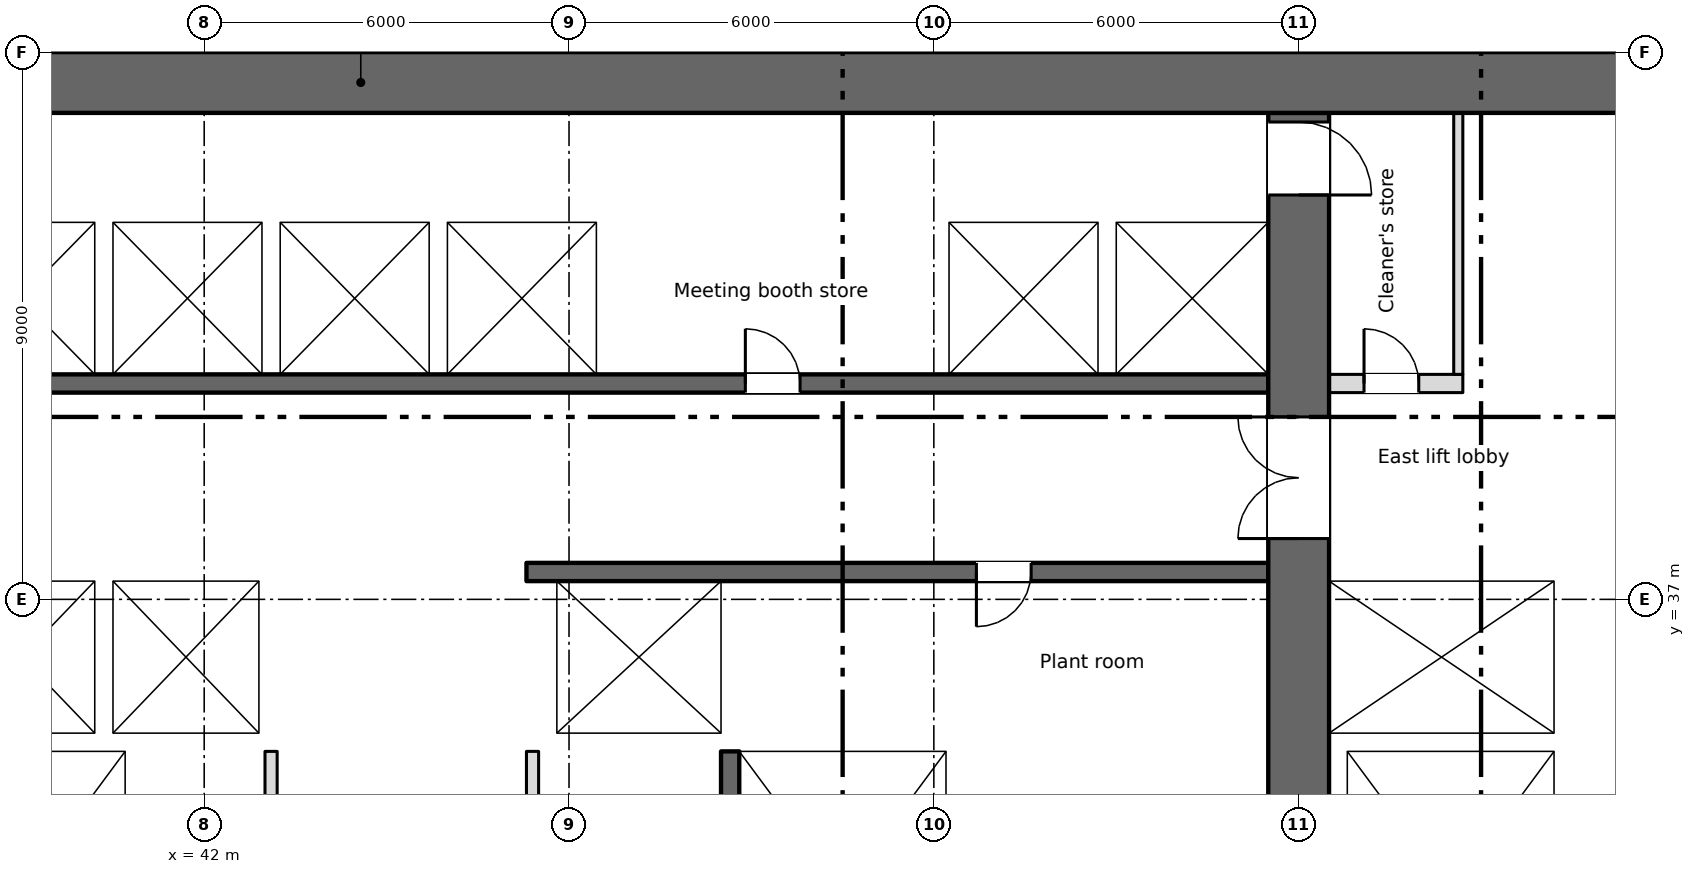
"""IFC4 building model, lengths in metres.
Left out: names, types, materials, properties, quantities, classifications, styles, units other than length and angle.
Written with IfcOpenShell. Run it as: python <this file> out.ifc"""

import sys

from ifc_helpers import new_model, si_unit, direction, frame, frame_2d, origin, place, context, subcontext, project, spatial, rectangle, extrude, element, fill, save


model = new_model("IFC4")
c1 = context("Model", 3, precision=1e-05, world=origin(), true_north=direction((0.0, 1.0)))
c2 = subcontext(c1, "Body", "Model", "MODEL_VIEW")
j1 = project(units=[si_unit("LENGTHUNIT", "METRE"), si_unit("PLANEANGLEUNIT", "RADIAN")], contexts=[c1])
p1 = place(None, origin())
s1 = spatial("IfcSite", under=j1, at=p1, CompositionType="ELEMENT")
p2 = place(p1, origin())
s2 = spatial("IfcBuilding", under=s1, at=p2, CompositionType="ELEMENT")
p3 = place(p2, frame((0.0, 0.0, 71.25)))
s3 = spatial("IfcBuildingStorey", under=s2, at=p3, CompositionType="ELEMENT", Elevation=71.25)
p4 = place(p3, frame((5.55, 45.5, 0.0), z_axis=(0.0, 0.0, 1.0), x_axis=(1.0, 0.0, 0.0)))
e1 = element("IfcWall", 1, at=p4, inside=s3, PredefinedType="SHEAR", context=c2, shape_type="SweptSolid", body=[
    extrude(rectangle(XDim=66.9, YDim=1.0, at=frame_2d((33.45, 0.0))), origin(), (0.0, 0.0, 1.0), 3.35),
])
p5 = place(p4, frame((1.2, 0.0, 0.6)))
e2 = element("IfcOpeningElement", 2, at=p5, cuts=e1, PredefinedType="OPENING", context=c2, shape_type="SweptSolid", body=[
    extrude(rectangle(XDim=0.6, YDim=2.4, at=frame_2d((0.3, 1.2))), frame((0.0, 0.51, 0.0), z_axis=(0.0, -1.0, 0.0), x_axis=(1.0, 0.0, 0.0)), (0.0, 0.0, 1.0), 1.02),
])
p6 = place(p4, frame((7.2, 0.0, 0.6)))
e3 = element("IfcOpeningElement", 3, at=p6, cuts=e1, PredefinedType="OPENING", context=c2, shape_type="SweptSolid", body=[
    extrude(rectangle(XDim=0.6, YDim=2.4, at=frame_2d((0.3, 1.2))), frame((0.0, 0.51, 0.0), z_axis=(0.0, -1.0, 0.0), x_axis=(1.0, 0.0, 0.0)), (0.0, 0.0, 1.0), 1.02),
])
p7 = place(p4, frame((61.2, 0.0, 0.6)))
e4 = element("IfcOpeningElement", 4, at=p7, cuts=e1, PredefinedType="OPENING", context=c2, shape_type="SweptSolid", body=[
    extrude(rectangle(XDim=0.6, YDim=2.4, at=frame_2d((0.3, 1.2))), frame((0.0, 0.51, 0.0), z_axis=(0.0, -1.0, 0.0), x_axis=(1.0, 0.0, 0.0)), (0.0, 0.0, 1.0), 1.02),
])
p8 = place(p3, frame((64.35, 34.8, 0.0), z_axis=(0.0, 0.0, 1.0), x_axis=(0.0, 1.0, 0.0)))
e5 = element("IfcWall", 5, at=p8, inside=s3, PredefinedType="SHEAR", context=c2, shape_type="SweptSolid", body=[
    extrude(rectangle(XDim=10.2, YDim=0.3, at=frame_2d((5.1, 0.0))), origin(), (0.0, 0.0, 1.0), 3.35),
])
p9 = place(p3, frame((60.0, 28.4, 0.0), z_axis=(0.0, 0.0, 1.0), x_axis=(0.0, 1.0, 0.0)))
e6 = element("IfcWall", 6, at=p9, inside=s3, PredefinedType="SHEAR", context=c2, shape_type="SweptSolid", body=[
    extrude(rectangle(XDim=16.6, YDim=1.0, at=frame_2d((8.3, 0.0))), origin(), (0.0, 0.0, 1.0), 3.35),
])
p10 = place(p9, frame((9.6, 0.0, 0.0)))
e7 = element("IfcOpeningElement", 7, at=p10, cuts=e6, PredefinedType="OPENING", context=c2, shape_type="SweptSolid", body=[
    extrude(rectangle(XDim=2.0, YDim=2.1, at=frame_2d((1.0, 1.05))), frame((0.0, 0.51, 0.0), z_axis=(0.0, -1.0, 0.0), x_axis=(1.0, 0.0, 0.0)), (0.0, 0.0, 1.0), 1.02),
])
p11 = place(p9, frame((15.25, 0.0, 0.0)))
e8 = element("IfcOpeningElement", 8, at=p11, cuts=e6, PredefinedType="OPENING", context=c2, shape_type="SweptSolid", body=[
    extrude(rectangle(XDim=1.2, YDim=2.1, at=frame_2d((0.6, 1.05))), frame((0.0, 0.51, 0.0), z_axis=(0.0, -1.0, 0.0), x_axis=(1.0, 0.0, 0.0)), (0.0, 0.0, 1.0), 1.02),
])
p12 = place(p3, frame((40.85, 28.4, 0.0), z_axis=(0.0, 0.0, 1.0), x_axis=(0.0, 1.0, 0.0)))
e9 = element("IfcWall", 9, at=p12, inside=s3, PredefinedType="SHEAR", context=c2, shape_type="SweptSolid", body=[
    extrude(rectangle(XDim=6.1, YDim=0.3, at=frame_2d((3.05, 0.0))), origin(), (0.0, 0.0, 1.0), 3.35),
])
p13 = place(p3, frame((50.65, 34.5, 0.0), z_axis=(0.0, 0.0, 1.0), x_axis=(0.0, -1.0, 0.0)))
e10 = element("IfcWall", 10, at=p13, inside=s3, PredefinedType="SHEAR", context=c2, shape_type="SweptSolid", body=[
    extrude(rectangle(XDim=6.1, YDim=0.3, at=frame_2d((3.05, 0.0))), origin(), (0.0, 0.0, 1.0), 3.35),
])
p14 = place(p13, frame((4.95, 0.0, 0.0)))
e11 = element("IfcOpeningElement", 11, at=p14, cuts=e10, PredefinedType="OPENING", context=c2, shape_type="SweptSolid", body=[
    extrude(rectangle(XDim=1.1, YDim=2.1, at=frame_2d((0.55, 1.05))), frame((0.0, 0.16, 0.0), z_axis=(0.0, -1.0, 0.0), x_axis=(1.0, 0.0, 0.0)), (0.0, 0.0, 1.0), 0.32),
])
for number, where, z_axis, x_axis in (
    (12, (54.35, 28.4, 0.0), (0.0, 0.0, 1.0), (0.0, 1.0, 0.0)),
    (13, (60.65, 28.4, 0.0), (0.0, 0.0, 1.0), (0.0, 1.0, 0.0)),
    (14, (64.35, 28.4, 0.0), (0.0, 0.0, 1.0), (0.0, 1.0, 0.0)),
):
    element("IfcWall", number, at=place(p3, frame(where, z_axis=z_axis, x_axis=x_axis)), inside=s3, PredefinedType="SHEAR", context=c2, shape_type="SweptSolid", body=[
        extrude(rectangle(XDim=6.1, YDim=0.3, at=frame_2d((3.05, 0.0))), origin(), (0.0, 0.0, 1.0), 3.35),
    ])
p15 = place(p3, frame((34.8, 34.65, 0.0), z_axis=(0.0, 0.0, 1.0), x_axis=(1.0, 0.0, 0.0)))
e15 = element("IfcWall", 15, at=p15, inside=s3, PredefinedType="SHEAR", context=c2, shape_type="SweptSolid", body=[
    extrude(rectangle(XDim=8.4, YDim=0.3, at=frame_2d((4.2, 0.0))), origin(), (0.0, 0.0, 1.0), 3.35),
])
p16 = place(p3, frame((47.3, 34.65, 0.0), z_axis=(0.0, 0.0, 1.0), x_axis=(1.0, 0.0, 0.0)))
e16 = element("IfcWall", 16, at=p16, inside=s3, PredefinedType="SHEAR", context=c2, shape_type="SweptSolid", body=[
    extrude(rectangle(XDim=12.2, YDim=0.3, at=frame_2d((6.1, 0.0))), origin(), (0.0, 0.0, 1.0), 3.35),
])
p17 = place(p16, frame((1.3, 0.0, 0.0)))
e17 = element("IfcOpeningElement", 17, at=p17, cuts=e16, PredefinedType="OPENING", context=c2, shape_type="SweptSolid", body=[
    extrude(rectangle(XDim=1.1, YDim=2.1, at=frame_2d((0.55, 1.05))), frame((0.0, 0.16, 0.0), z_axis=(0.0, -1.0, 0.0), x_axis=(1.0, 0.0, 0.0)), (0.0, 0.0, 1.0), 0.32),
])
p18 = place(p3, frame((60.5, 34.65, 0.0), z_axis=(0.0, 0.0, 1.0), x_axis=(1.0, 0.0, 0.0)))
e18 = element("IfcWall", 18, at=p18, inside=s3, PredefinedType="SHEAR", context=c2, shape_type="SweptSolid", body=[
    extrude(rectangle(XDim=4.0, YDim=0.3, at=frame_2d((2.0, 0.0))), origin(), (0.0, 0.0, 1.0), 3.35),
])
p19 = place(p3, frame((34.8, 37.45, 0.0), z_axis=(0.0, 0.0, 1.0), x_axis=(1.0, 0.0, 0.0)))
e19 = element("IfcWall", 19, at=p19, inside=s3, PredefinedType="SHEAR", context=c2, shape_type="SweptSolid", body=[
    extrude(rectangle(XDim=8.4, YDim=0.3, at=frame_2d((4.2, 0.0))), origin(), (0.0, 0.0, 1.0), 3.35),
])
p20 = place(p19, frame((0.95, 0.0, 0.0)))
e20 = element("IfcOpeningElement", 20, at=p20, cuts=e19, PredefinedType="OPENING", context=c2, shape_type="SweptSolid", body=[
    extrude(rectangle(XDim=1.1, YDim=2.1, at=frame_2d((0.55, 1.05))), frame((0.0, 0.16, 0.0), z_axis=(0.0, -1.0, 0.0), x_axis=(1.0, 0.0, 0.0)), (0.0, 0.0, 1.0), 0.32),
])
p21 = place(p19, frame((3.65, 0.0, 0.0)))
e21 = element("IfcOpeningElement", 21, at=p21, cuts=e19, PredefinedType="OPENING", context=c2, shape_type="SweptSolid", body=[
    extrude(rectangle(XDim=1.1, YDim=2.1, at=frame_2d((0.55, 1.05))), frame((0.0, 0.16, 0.0), z_axis=(0.0, -1.0, 0.0), x_axis=(1.0, 0.0, 0.0)), (0.0, 0.0, 1.0), 0.32),
])
p22 = place(p19, frame((6.35, 0.0, 0.0)))
e22 = element("IfcOpeningElement", 22, at=p22, cuts=e19, PredefinedType="OPENING", context=c2, shape_type="SweptSolid", body=[
    extrude(rectangle(XDim=1.1, YDim=2.1, at=frame_2d((0.55, 1.05))), frame((0.0, 0.16, 0.0), z_axis=(0.0, -1.0, 0.0), x_axis=(1.0, 0.0, 0.0)), (0.0, 0.0, 1.0), 0.32),
])
p23 = place(p3, frame((59.5, 37.45, 0.0), z_axis=(0.0, 0.0, 1.0), x_axis=(-1.0, 0.0, 0.0)))
e23 = element("IfcWall", 23, at=p23, inside=s3, PredefinedType="SHEAR", context=c2, shape_type="SweptSolid", body=[
    extrude(rectangle(XDim=12.2, YDim=0.3, at=frame_2d((6.1, 0.0))), origin(), (0.0, 0.0, 1.0), 3.35),
])
p24 = place(p23, frame((3.9, 0.0, 0.0)))
e24 = element("IfcOpeningElement", 24, at=p24, cuts=e23, PredefinedType="OPENING", context=c2, shape_type="SweptSolid", body=[
    extrude(rectangle(XDim=0.9, YDim=2.1, at=frame_2d((0.45, 1.05))), frame((0.0, 0.16, 0.0), z_axis=(0.0, -1.0, 0.0), x_axis=(1.0, 0.0, 0.0)), (0.0, 0.0, 1.0), 0.32),
])
p25 = place(p3, frame((60.5, 37.45, 0.0), z_axis=(0.0, 0.0, 1.0), x_axis=(1.0, 0.0, 0.0)))
e25 = element("IfcWall", 25, at=p25, inside=s3, PredefinedType="SHEAR", context=c2, shape_type="SweptSolid", body=[
    extrude(rectangle(XDim=3.7, YDim=0.3, at=frame_2d((1.85, 0.0))), origin(), (0.0, 0.0, 1.0), 3.35),
])
p26 = place(p25, frame((1.3, 0.0, 0.0)))
e26 = element("IfcOpeningElement", 26, at=p26, cuts=e25, PredefinedType="OPENING", context=c2, shape_type="SweptSolid", body=[
    extrude(rectangle(XDim=1.1, YDim=2.1, at=frame_2d((0.55, 1.05))), frame((0.0, 0.16, 0.0), z_axis=(0.0, -1.0, 0.0), x_axis=(1.0, 0.0, 0.0)), (0.0, 0.0, 1.0), 0.32),
])
p27 = place(p3, frame((43.05, 34.8, 0.0), z_axis=(0.0, 0.0, 1.0), x_axis=(0.0, 1.0, 0.0)))
e27 = element("IfcWall", 27, at=p27, inside=s3, PredefinedType="SHEAR", context=c2, shape_type="SweptSolid", body=[
    extrude(rectangle(XDim=2.5, YDim=0.3, at=frame_2d((1.25, 0.0))), origin(), (0.0, 0.0, 1.0), 3.35),
])
p28 = place(p3, frame((47.55, 34.8, 0.0), z_axis=(0.0, 0.0, 1.0), x_axis=(0.0, 1.0, 0.0)))
e28 = element("IfcWall", 28, at=p28, inside=s3, PredefinedType="SHEAR", context=c2, shape_type="SweptSolid", body=[
    extrude(rectangle(XDim=2.5, YDim=0.5, at=frame_2d((1.25, 0.0))), origin(), (0.0, 0.0, 1.0), 3.35),
])
p29 = place(p3, frame((50.65, 34.8, 0.0), z_axis=(0.0, 0.0, 1.0), x_axis=(0.0, 1.0, 0.0)))
e29 = element("IfcWall", 29, at=p29, inside=s3, PredefinedType="SHEAR", context=c2, shape_type="SweptSolid", body=[
    extrude(rectangle(XDim=2.5, YDim=0.3, at=frame_2d((1.25, 0.0))), origin(), (0.0, 0.0, 1.0), 3.35),
])
p30 = place(p3, frame((18.5, 40.55, 0.0), z_axis=(0.0, 0.0, 1.0), x_axis=(1.0, 0.0, 0.0)))
e30 = element("IfcWall", 30, at=p30, inside=s3, PredefinedType="SHEAR", context=c2, shape_type="SweptSolid", body=[
    extrude(rectangle(XDim=41.0, YDim=0.3, at=frame_2d((20.5, 0.0))), origin(), (0.0, 0.0, 1.0), 3.35),
])
p31 = place(p30, frame((9.025, 0.0, 0.0)))
e31 = element("IfcOpeningElement", 31, at=p31, cuts=e30, PredefinedType="OPENING", context=c2, shape_type="SweptSolid", body=[
    extrude(rectangle(XDim=0.9, YDim=2.1, at=frame_2d((0.45, 1.05))), frame((0.0, 0.16, 0.0), z_axis=(0.0, -1.0, 0.0), x_axis=(1.0, 0.0, 0.0)), (0.0, 0.0, 1.0), 0.32),
])
p32 = place(p30, frame((32.4, 0.0, 0.0)))
e32 = element("IfcOpeningElement", 32, at=p32, cuts=e30, PredefinedType="OPENING", context=c2, shape_type="SweptSolid", body=[
    extrude(rectangle(XDim=0.9, YDim=2.1, at=frame_2d((0.45, 1.05))), frame((0.0, 0.16, 0.0), z_axis=(0.0, -1.0, 0.0), x_axis=(1.0, 0.0, 0.0)), (0.0, 0.0, 1.0), 0.32),
])
p33 = place(p30, frame((14.425, 0.0, 0.0)))
e33 = element("IfcOpeningElement", 33, at=p33, cuts=e30, PredefinedType="OPENING", context=c2, shape_type="SweptSolid", body=[
    extrude(rectangle(XDim=1.1, YDim=2.1, at=frame_2d((0.55, 1.05))), frame((0.0, 0.16, 0.0), z_axis=(0.0, -1.0, 0.0), x_axis=(1.0, 0.0, 0.0)), (0.0, 0.0, 1.0), 0.32),
])
p34 = place(p30, frame((17.175, 0.0, 0.0)))
e34 = element("IfcOpeningElement", 34, at=p34, cuts=e30, PredefinedType="OPENING", context=c2, shape_type="SweptSolid", body=[
    extrude(rectangle(XDim=1.1, YDim=2.1, at=frame_2d((0.55, 1.05))), frame((0.0, 0.16, 0.0), z_axis=(0.0, -1.0, 0.0), x_axis=(1.0, 0.0, 0.0)), (0.0, 0.0, 1.0), 0.32),
])
p35 = place(p30, frame((19.925, 0.0, 0.0)))
e35 = element("IfcOpeningElement", 35, at=p35, cuts=e30, PredefinedType="OPENING", context=c2, shape_type="SweptSolid", body=[
    extrude(rectangle(XDim=1.1, YDim=2.1, at=frame_2d((0.55, 1.05))), frame((0.0, 0.16, 0.0), z_axis=(0.0, -1.0, 0.0), x_axis=(1.0, 0.0, 0.0)), (0.0, 0.0, 1.0), 0.32),
])
p36 = place(p30, frame((22.675, 0.0, 0.0)))
e36 = element("IfcOpeningElement", 36, at=p36, cuts=e30, PredefinedType="OPENING", context=c2, shape_type="SweptSolid", body=[
    extrude(rectangle(XDim=1.1, YDim=2.1, at=frame_2d((0.55, 1.05))), frame((0.0, 0.16, 0.0), z_axis=(0.0, -1.0, 0.0), x_axis=(1.0, 0.0, 0.0)), (0.0, 0.0, 1.0), 0.32),
])
p37 = place(p30, frame((36.375, 0.0, 0.0)))
e37 = element("IfcOpeningElement", 37, at=p37, cuts=e30, PredefinedType="OPENING", context=c2, shape_type="SweptSolid", body=[
    extrude(rectangle(XDim=1.2, YDim=2.1, at=frame_2d((0.6, 1.05))), frame((0.0, 0.16, 0.0), z_axis=(0.0, -1.0, 0.0), x_axis=(1.0, 0.0, 0.0)), (0.0, 0.0, 1.0), 0.32),
])
p38 = place(p30, frame((39.15, 0.0, 0.0)))
e38 = element("IfcOpeningElement", 38, at=p38, cuts=e30, PredefinedType="OPENING", context=c2, shape_type="SweptSolid", body=[
    extrude(rectangle(XDim=1.2, YDim=2.1, at=frame_2d((0.6, 1.05))), frame((0.0, 0.16, 0.0), z_axis=(0.0, -1.0, 0.0), x_axis=(1.0, 0.0, 0.0)), (0.0, 0.0, 1.0), 0.32),
])
p39 = place(p3, frame((18.5, 43.35, 0.0), z_axis=(0.0, 0.0, 1.0), x_axis=(1.0, 0.0, 0.0)))
e39 = element("IfcWall", 39, at=p39, inside=s3, PredefinedType="SHEAR", context=c2, shape_type="SweptSolid", body=[
    extrude(rectangle(XDim=41.0, YDim=0.3, at=frame_2d((20.5, 0.0))), origin(), (0.0, 0.0, 1.0), 3.35),
])
p40 = place(p3, frame((60.5, 40.55, 0.0), z_axis=(0.0, 0.0, 1.0), x_axis=(1.0, 0.0, 0.0)))
e40 = element("IfcWall", 40, at=p40, inside=s3, PredefinedType="PARTITIONING", context=c2, shape_type="SweptSolid", body=[
    extrude(rectangle(XDim=2.2, YDim=0.3, at=frame_2d((1.1, 0.0))), origin(), (0.0, 0.0, 1.0), 3.35),
])
p41 = place(p40, frame((0.575, 0.0, 0.0)))
e41 = element("IfcOpeningElement", 41, at=p41, cuts=e40, PredefinedType="OPENING", context=c2, shape_type="SweptSolid", body=[
    extrude(rectangle(XDim=0.9, YDim=2.1, at=frame_2d((0.45, 1.05))), frame((0.0, 0.16, 0.0), z_axis=(0.0, -1.0, 0.0), x_axis=(1.0, 0.0, 0.0)), (0.0, 0.0, 1.0), 0.32),
])
for number, where, z_axis, x_axis in (
    (42, (40.35, 34.8, 0.0), (0.0, 0.0, 1.0), (0.0, 1.0, 0.0)),
    (43, (40.35, 40.7, 0.0), (0.0, 0.0, 1.0), (0.0, 1.0, 0.0)),
    (44, (43.1, 40.7, 0.0), (0.0, 0.0, 1.0), (0.0, 1.0, 0.0)),
    (45, (45.85, 40.7, 0.0), (0.0, 0.0, 1.0), (0.0, 1.0, 0.0)),
    (46, (48.6, 40.7, 0.0), (0.0, 0.0, 1.0), (0.0, 1.0, 0.0)),
    (47, (54.1, 40.7, 0.0), (0.0, 0.0, 1.0), (0.0, 1.0, 0.0)),
    (48, (56.85, 40.7, 0.0), (0.0, 0.0, 1.0), (0.0, 1.0, 0.0)),
):
    element("IfcWall", number, at=place(p3, frame(where, z_axis=z_axis, x_axis=x_axis)), inside=s3, PredefinedType="SHEAR", context=c2, shape_type="SweptSolid", body=[
        extrude(rectangle(XDim=2.5, YDim=0.3, at=frame_2d((1.25, 0.0))), origin(), (0.0, 0.0, 1.0), 3.35),
    ])
for number, where, z_axis, x_axis in (
    (49, (43.1, 28.4, 0.0), (0.0, 0.0, 1.0), (0.0, 1.0, 0.0)),
    (50, (47.4, 28.4, 0.0), (0.0, 0.0, 1.0), (0.0, 1.0, 0.0)),
):
    element("IfcWall", number, at=place(p3, frame(where, z_axis=z_axis, x_axis=x_axis)), inside=s3, PredefinedType="PARTITIONING", context=c2, shape_type="SweptSolid", body=[
        extrude(rectangle(XDim=6.1, YDim=0.2, at=frame_2d((3.05, 0.0))), origin(), (0.0, 0.0, 1.0), 3.35),
    ])
p42 = place(p3, frame((62.625, 40.7, 0.0), z_axis=(0.0, 0.0, 1.0), x_axis=(0.0, 1.0, 0.0)))
e51 = element("IfcWall", 51, at=p42, inside=s3, PredefinedType="PARTITIONING", context=c2, shape_type="SweptSolid", body=[
    extrude(rectangle(XDim=4.3, YDim=0.15, at=frame_2d((2.15, 0.0))), origin(), (0.0, 0.0, 1.0), 3.35),
])
p43 = place(p41, origin())
e52 = element("IfcDoor", 52, at=p43, inside=s3, OperationType="SINGLE_SWING_LEFT", PredefinedType="DOOR", context=c2, shape_type="SweptSolid", body=[
    extrude(rectangle(XDim=0.9, YDim=2.1, at=frame_2d((0.45, 1.05))), frame((0.0, 0.025, 0.0), z_axis=(0.0, -1.0, 0.0), x_axis=(1.0, 0.0, 0.0)), (0.0, 0.0, 1.0), 0.05),
])
fill(e41, e52)
p44 = place(p24, origin())
e53 = element("IfcDoor", 53, at=p44, inside=s3, OperationType="SINGLE_SWING_RIGHT", PredefinedType="DOOR", context=c2, shape_type="SweptSolid", body=[
    extrude(rectangle(XDim=0.9, YDim=2.1, at=frame_2d((0.45, 1.05))), frame((0.0, 0.025, 0.0), z_axis=(0.0, -1.0, 0.0), x_axis=(1.0, 0.0, 0.0)), (0.0, 0.0, 1.0), 0.05),
])
fill(e24, e53)
p45 = place(p32, origin())
e54 = element("IfcDoor", 54, at=p45, inside=s3, OperationType="SINGLE_SWING_LEFT", PredefinedType="DOOR", context=c2, shape_type="SweptSolid", body=[
    extrude(rectangle(XDim=0.9, YDim=2.1, at=frame_2d((0.45, 1.05))), frame((0.0, 0.025, 0.0), z_axis=(0.0, -1.0, 0.0), x_axis=(1.0, 0.0, 0.0)), (0.0, 0.0, 1.0), 0.05),
])
fill(e32, e54)
p46 = place(p21, origin())
e55 = element("IfcDoor", 55, at=p46, inside=s3, OperationType="SLIDING_TO_LEFT", PredefinedType="DOOR", context=c2, shape_type="SweptSolid", body=[
    extrude(rectangle(XDim=1.1, YDim=2.1, at=frame_2d((0.55, 1.05))), frame((0.0, 0.025, 0.0), z_axis=(0.0, -1.0, 0.0), x_axis=(1.0, 0.0, 0.0)), (0.0, 0.0, 1.0), 0.05),
])
fill(e21, e55)
p47 = place(p22, origin())
e56 = element("IfcDoor", 56, at=p47, inside=s3, OperationType="SLIDING_TO_LEFT", PredefinedType="DOOR", context=c2, shape_type="SweptSolid", body=[
    extrude(rectangle(XDim=1.1, YDim=2.1, at=frame_2d((0.55, 1.05))), frame((0.0, 0.025, 0.0), z_axis=(0.0, -1.0, 0.0), x_axis=(1.0, 0.0, 0.0)), (0.0, 0.0, 1.0), 0.05),
])
fill(e22, e56)
p48 = place(p35, origin())
e57 = element("IfcDoor", 57, at=p48, inside=s3, OperationType="SLIDING_TO_LEFT", PredefinedType="DOOR", context=c2, shape_type="SweptSolid", body=[
    extrude(rectangle(XDim=1.1, YDim=2.1, at=frame_2d((0.55, 1.05))), frame((0.0, 0.025, 0.0), z_axis=(0.0, -1.0, 0.0), x_axis=(1.0, 0.0, 0.0)), (0.0, 0.0, 1.0), 0.05),
])
fill(e35, e57)
p49 = place(p36, origin())
e58 = element("IfcDoor", 58, at=p49, inside=s3, OperationType="SLIDING_TO_LEFT", PredefinedType="DOOR", context=c2, shape_type="SweptSolid", body=[
    extrude(rectangle(XDim=1.1, YDim=2.1, at=frame_2d((0.55, 1.05))), frame((0.0, 0.025, 0.0), z_axis=(0.0, -1.0, 0.0), x_axis=(1.0, 0.0, 0.0)), (0.0, 0.0, 1.0), 0.05),
])
fill(e36, e58)
p50 = place(p37, origin())
e59 = element("IfcDoor", 59, at=p50, inside=s3, OperationType="SLIDING_TO_LEFT", PredefinedType="DOOR", context=c2, shape_type="SweptSolid", body=[
    extrude(rectangle(XDim=1.2, YDim=2.1, at=frame_2d((0.6, 1.05))), frame((0.0, 0.025, 0.0), z_axis=(0.0, -1.0, 0.0), x_axis=(1.0, 0.0, 0.0)), (0.0, 0.0, 1.0), 0.05),
])
fill(e37, e59)
p51 = place(p38, origin())
e60 = element("IfcDoor", 60, at=p51, inside=s3, OperationType="SLIDING_TO_LEFT", PredefinedType="DOOR", context=c2, shape_type="SweptSolid", body=[
    extrude(rectangle(XDim=1.2, YDim=2.1, at=frame_2d((0.6, 1.05))), frame((0.0, 0.025, 0.0), z_axis=(0.0, -1.0, 0.0), x_axis=(1.0, 0.0, 0.0)), (0.0, 0.0, 1.0), 0.05),
])
fill(e38, e60)
p52 = place(p26, origin())
e61 = element("IfcDoor", 61, at=p52, inside=s3, OperationType="SLIDING_TO_LEFT", PredefinedType="DOOR", context=c2, shape_type="SweptSolid", body=[
    extrude(rectangle(XDim=1.1, YDim=2.1, at=frame_2d((0.55, 1.05))), frame((0.0, 0.025, 0.0), z_axis=(0.0, -1.0, 0.0), x_axis=(1.0, 0.0, 0.0)), (0.0, 0.0, 1.0), 0.05),
])
fill(e26, e61)
p53 = place(p17, origin())
e62 = element("IfcDoor", 62, at=p53, inside=s3, OperationType="SLIDING_TO_LEFT", PredefinedType="DOOR", context=c2, shape_type="SweptSolid", body=[
    extrude(rectangle(XDim=1.1, YDim=2.1, at=frame_2d((0.55, 1.05))), frame((0.0, 0.025, 0.0), z_axis=(0.0, -1.0, 0.0), x_axis=(1.0, 0.0, 0.0)), (0.0, 0.0, 1.0), 0.05),
])
fill(e17, e62)
p54 = place(p10, origin())
e63 = element("IfcDoor", 63, at=p54, inside=s3, OperationType="DOUBLE_DOOR_SINGLE_SWING", PredefinedType="DOOR", context=c2, shape_type="SweptSolid", body=[
    extrude(rectangle(XDim=2.0, YDim=2.1, at=frame_2d((1.0, 1.05))), frame((0.0, 0.025, 0.0), z_axis=(0.0, -1.0, 0.0), x_axis=(1.0, 0.0, 0.0)), (0.0, 0.0, 1.0), 0.05),
])
fill(e7, e63)
p55 = place(p11, origin())
e64 = element("IfcDoor", 64, at=p55, inside=s3, OperationType="SINGLE_SWING_LEFT", PredefinedType="DOOR", context=c2, shape_type="SweptSolid", body=[
    extrude(rectangle(XDim=1.2, YDim=2.1, at=frame_2d((0.6, 1.05))), frame((0.0, 0.025, 0.0), z_axis=(0.0, -1.0, 0.0), x_axis=(1.0, 0.0, 0.0)), (0.0, 0.0, 1.0), 0.05),
])
fill(e8, e64)
save(model, sys.argv[1])
